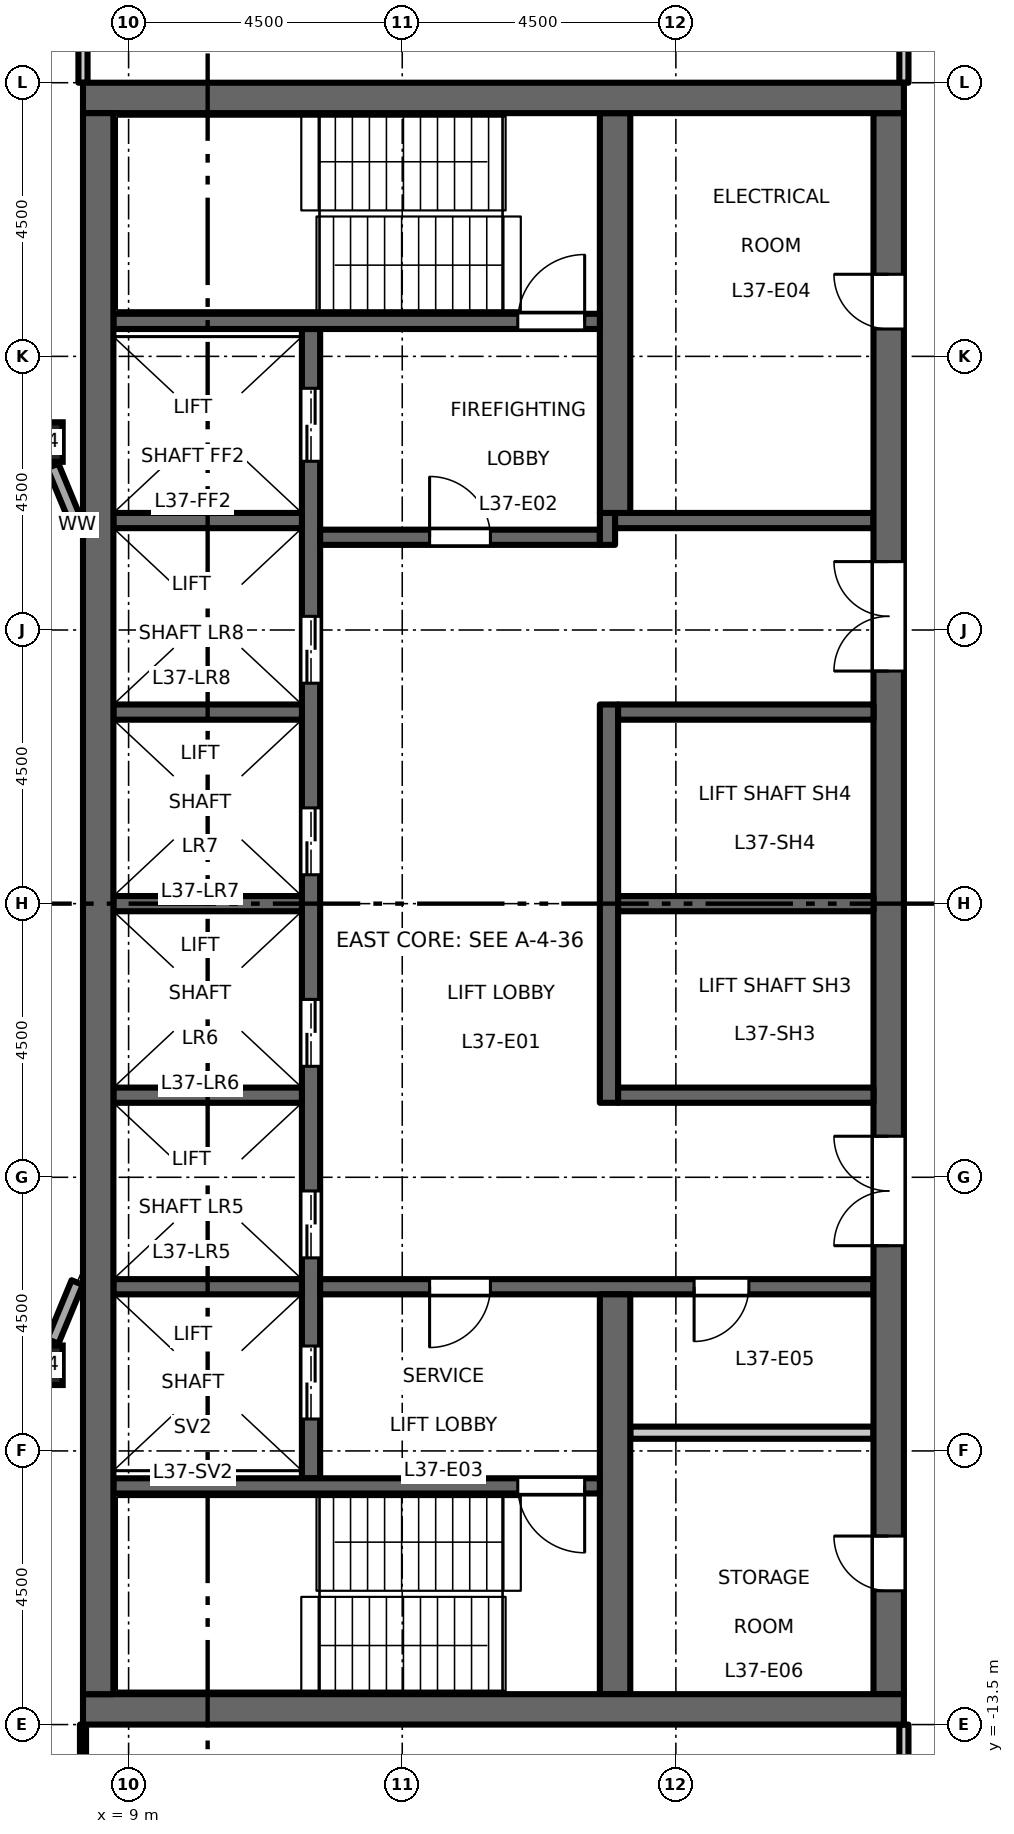
"""IFC4 building model, lengths in metres.
Left out: names, types, materials, properties, quantities, classifications, styles, units other than length and angle.
Written with IfcOpenShell. Run it as: python <this file> out.ifc"""

import sys

from ifc_helpers import new_model, si_unit, direction, frame, frame_2d, origin, origin_2d, place, context, subcontext, project, spatial, rectangle, hollow_rectangle, extrude, element, fill, save


model = new_model("IFC4")
c1 = context("Model", 3, precision=1e-05, world=origin(), true_north=direction((0.0, 1.0)))
c2 = subcontext(c1, "Body", "Model", "MODEL_VIEW")
j1 = project(units=[si_unit("LENGTHUNIT", "METRE"), si_unit("PLANEANGLEUNIT", "RADIAN")], contexts=[c1])
p1 = place(None, origin())
s1 = spatial("IfcSite", under=j1, at=p1, CompositionType="ELEMENT")
p2 = place(p1, origin())
s2 = spatial("IfcBuilding", under=s1, at=p2, CompositionType="ELEMENT")
p3 = place(p2, frame((0.0, 0.0, 172.2)))
s3 = spatial("IfcBuildingStorey", under=s2, at=p3, CompositionType="ELEMENT", Elevation=172.2)
for number, where, z_axis, x_axis in (
    (1, (7.591, -7.591, 0.0), (0.0, 0.0, 1.0), (1.0, 0.0, 0.0)),
    (2, (7.591, 7.591, 0.0), (0.0, 0.0, 1.0), (1.0, 0.0, 0.0)),
):
    element("IfcColumn", number, at=place(p3, frame(where, z_axis=z_axis, x_axis=x_axis)), inside=s3, PredefinedType="COLUMN", context=c2, shape_type="SweptSolid", body=[
        extrude(hollow_rectangle(XDim=0.65, YDim=0.65, WallThickness=0.036, at=origin_2d()), origin(), (0.0, 0.0, 1.0), 4.5),
    ])
p4 = place(p3, frame((12.0, -9.45, 0.0), z_axis=(0.0, 0.0, 1.0), x_axis=(0.0, 1.0, 0.0)))
e3 = element("IfcWall", 3, at=p4, inside=s3, PredefinedType="SHEAR", context=c2, shape_type="SweptSolid", body=[
    extrude(rectangle(XDim=18.9, YDim=0.3, at=frame_2d((9.45, 0.0))), origin(), (0.0, 0.0, 1.0), 4.35),
])
p5 = place(p4, frame((3.625, 0.0, 0.0)))
e4 = element("IfcOpeningElement", 4, at=p5, cuts=e3, PredefinedType="OPENING", context=c2, shape_type="SweptSolid", body=[
    extrude(rectangle(XDim=1.1, YDim=2.1, at=frame_2d((0.55, 1.05))), frame((0.0, 0.16, 0.0), z_axis=(0.0, -1.0, 0.0), x_axis=(1.0, 0.0, 0.0)), (0.0, 0.0, 1.0), 0.32),
])
p6 = place(p4, frame((6.775, 0.0, 0.0)))
e5 = element("IfcOpeningElement", 5, at=p6, cuts=e3, PredefinedType="OPENING", context=c2, shape_type="SweptSolid", body=[
    extrude(rectangle(XDim=1.1, YDim=2.1, at=frame_2d((0.55, 1.05))), frame((0.0, 0.16, 0.0), z_axis=(0.0, -1.0, 0.0), x_axis=(1.0, 0.0, 0.0)), (0.0, 0.0, 1.0), 0.32),
])
p7 = place(p4, frame((9.925, 0.0, 0.0)))
e6 = element("IfcOpeningElement", 6, at=p7, cuts=e3, PredefinedType="OPENING", context=c2, shape_type="SweptSolid", body=[
    extrude(rectangle(XDim=1.1, YDim=2.1, at=frame_2d((0.55, 1.05))), frame((0.0, 0.16, 0.0), z_axis=(0.0, -1.0, 0.0), x_axis=(1.0, 0.0, 0.0)), (0.0, 0.0, 1.0), 0.32),
])
p8 = place(p4, frame((13.075, 0.0, 0.0)))
e7 = element("IfcOpeningElement", 7, at=p8, cuts=e3, PredefinedType="OPENING", context=c2, shape_type="SweptSolid", body=[
    extrude(rectangle(XDim=1.1, YDim=2.1, at=frame_2d((0.55, 1.05))), frame((0.0, 0.16, 0.0), z_axis=(0.0, -1.0, 0.0), x_axis=(1.0, 0.0, 0.0)), (0.0, 0.0, 1.0), 0.32),
])
p9 = place(p4, frame((16.725, 0.0, 0.0)))
e8 = element("IfcOpeningElement", 8, at=p9, cuts=e3, PredefinedType="OPENING", context=c2, shape_type="SweptSolid", body=[
    extrude(rectangle(XDim=1.2, YDim=2.1, at=frame_2d((0.6, 1.05))), frame((0.0, 0.16, 0.0), z_axis=(0.0, -1.0, 0.0), x_axis=(1.0, 0.0, 0.0)), (0.0, 0.0, 1.0), 0.32),
])
p10 = place(p4, frame((0.975, 0.0, 0.0)))
e9 = element("IfcOpeningElement", 9, at=p10, cuts=e3, PredefinedType="OPENING", context=c2, shape_type="SweptSolid", body=[
    extrude(rectangle(XDim=1.2, YDim=2.1, at=frame_2d((0.6, 1.05))), frame((0.0, 0.16, 0.0), z_axis=(0.0, -1.0, 0.0), x_axis=(1.0, 0.0, 0.0)), (0.0, 0.0, 1.0), 0.32),
])
p11 = place(p3, frame((12.15, 6.025, 0.0), z_axis=(0.0, 0.0, 1.0), x_axis=(1.0, 0.0, 0.0)))
e10 = element("IfcWall", 10, at=p11, inside=s3, PredefinedType="SHEAR", context=c2, shape_type="SweptSolid", body=[
    extrude(rectangle(XDim=4.6, YDim=0.25, at=frame_2d((2.3, 0.0))), origin(), (0.0, 0.0, 1.0), 4.35),
])
p12 = place(p11, frame((1.8, 0.0, 0.0)))
e11 = element("IfcOpeningElement", 11, at=p12, cuts=e10, PredefinedType="OPENING", context=c2, shape_type="SweptSolid", body=[
    extrude(rectangle(XDim=1.0, YDim=2.1, at=frame_2d((0.5, 1.05))), frame((0.0, 0.135, 0.0), z_axis=(0.0, -1.0, 0.0), x_axis=(1.0, 0.0, 0.0)), (0.0, 0.0, 1.0), 0.27),
])
p13 = place(p3, frame((16.875, 5.9, 0.0), z_axis=(0.0, 0.0, 1.0), x_axis=(0.0, 1.0, 0.0)))
e12 = element("IfcWall", 12, at=p13, inside=s3, PredefinedType="SHEAR", context=c2, shape_type="SweptSolid", body=[
    extrude(rectangle(XDim=0.525, YDim=0.25, at=frame_2d((0.263, 0.0))), origin(), (0.0, 0.0, 1.0), 4.35),
])
p14 = place(p3, frame((17.0, 6.3, 0.0), z_axis=(0.0, 0.0, 1.0), x_axis=(1.0, 0.0, 0.0)))
e13 = element("IfcWall", 13, at=p14, inside=s3, PredefinedType="SHEAR", context=c2, shape_type="SweptSolid", body=[
    extrude(rectangle(XDim=4.25, YDim=0.25, at=frame_2d((2.125, 0.0))), origin(), (0.0, 0.0, 1.0), 4.35),
])
p15 = place(p3, frame((12.15, -6.3, 0.0), z_axis=(0.0, 0.0, 1.0), x_axis=(1.0, 0.0, 0.0)))
e14 = element("IfcWall", 14, at=p15, inside=s3, PredefinedType="SHEAR", context=c2, shape_type="SweptSolid", body=[
    extrude(rectangle(XDim=9.1, YDim=0.25, at=frame_2d((4.55, 0.0))), origin(), (0.0, 0.0, 1.0), 4.35),
])
p16 = place(p15, frame((1.8, 0.0, 0.0)))
e15 = element("IfcOpeningElement", 15, at=p16, cuts=e14, PredefinedType="OPENING", context=c2, shape_type="SweptSolid", body=[
    extrude(rectangle(XDim=1.0, YDim=2.1, at=frame_2d((0.5, 1.05))), frame((0.0, 0.135, 0.0), z_axis=(0.0, -1.0, 0.0), x_axis=(1.0, 0.0, 0.0)), (0.0, 0.0, 1.0), 0.27),
])
p17 = place(p15, frame((6.15, 0.0, 0.0)))
e16 = element("IfcOpeningElement", 16, at=p17, cuts=e14, PredefinedType="OPENING", context=c2, shape_type="SweptSolid", body=[
    extrude(rectangle(XDim=0.9, YDim=2.1, at=frame_2d((0.45, 1.05))), frame((0.0, 0.135, 0.0), z_axis=(0.0, -1.0, 0.0), x_axis=(1.0, 0.0, 0.0)), (0.0, 0.0, 1.0), 0.27),
])
p18 = place(p3, frame((21.5, -13.0, 0.0), z_axis=(0.0, 0.0, 1.0), x_axis=(0.0, 1.0, 0.0)))
e17 = element("IfcWall", 17, at=p18, inside=s3, PredefinedType="SHEAR", context=c2, shape_type="SweptSolid", body=[
    extrude(rectangle(XDim=26.0, YDim=0.5, at=frame_2d((13.0, 0.0))), origin(), (0.0, 0.0, 1.0), 4.35),
])
p19 = place(p18, frame((16.825, 0.0, 0.0)))
e18 = element("IfcOpeningElement", 18, at=p19, cuts=e17, PredefinedType="OPENING", context=c2, shape_type="SweptSolid", body=[
    extrude(rectangle(XDim=1.8, YDim=2.1, at=frame_2d((0.9, 1.05))), frame((0.0, 0.26, 0.0), z_axis=(0.0, -1.0, 0.0), x_axis=(1.0, 0.0, 0.0)), (0.0, 0.0, 1.0), 0.52),
])
p20 = place(p18, frame((7.375, 0.0, 0.0)))
e19 = element("IfcOpeningElement", 19, at=p20, cuts=e17, PredefinedType="OPENING", context=c2, shape_type="SweptSolid", body=[
    extrude(rectangle(XDim=1.8, YDim=2.1, at=frame_2d((0.9, 1.05))), frame((0.0, 0.26, 0.0), z_axis=(0.0, -1.0, 0.0), x_axis=(1.0, 0.0, 0.0)), (0.0, 0.0, 1.0), 0.52),
])
p21 = place(p18, frame((22.45, 0.0, 0.0)))
e20 = element("IfcOpeningElement", 20, at=p21, cuts=e17, PredefinedType="OPENING", context=c2, shape_type="SweptSolid", body=[
    extrude(rectangle(XDim=0.9, YDim=2.1, at=frame_2d((0.45, 1.05))), frame((0.0, 0.26, 0.0), z_axis=(0.0, -1.0, 0.0), x_axis=(1.0, 0.0, 0.0)), (0.0, 0.0, 1.0), 0.52),
])
p22 = place(p18, frame((1.7, 0.0, 0.0)))
e21 = element("IfcOpeningElement", 21, at=p22, cuts=e17, PredefinedType="OPENING", context=c2, shape_type="SweptSolid", body=[
    extrude(rectangle(XDim=0.9, YDim=2.1, at=frame_2d((0.45, 1.05))), frame((0.0, 0.26, 0.0), z_axis=(0.0, -1.0, 0.0), x_axis=(1.0, 0.0, 0.0)), (0.0, 0.0, 1.0), 0.52),
])
p23 = place(p3, frame((17.25, -8.7, 0.0), z_axis=(0.0, 0.0, 1.0), x_axis=(1.0, 0.0, 0.0)))
e22 = element("IfcWall", 22, at=p23, inside=s3, PredefinedType="PARTITIONING", context=c2, shape_type="SweptSolid", body=[
    extrude(rectangle(XDim=4.0, YDim=0.2, at=frame_2d((2.0, 0.0))), origin(), (0.0, 0.0, 1.0), 4.35),
])
p24 = place(p3, frame((16.9, -3.275, 0.0), z_axis=(0.0, 0.0, 1.0), x_axis=(0.0, 1.0, 0.0)))
e23 = element("IfcWall", 23, at=p24, inside=s3, PredefinedType="SHEAR", context=c2, shape_type="SweptSolid", body=[
    extrude(rectangle(XDim=6.55, YDim=0.3, at=frame_2d((3.275, 0.0))), origin(), (0.0, 0.0, 1.0), 4.35),
])
for number, where, z_axis, x_axis in (
    (24, (17.05, 0.0, 0.0), (0.0, 0.0, 1.0), (1.0, 0.0, 0.0)),
    (25, (17.05, 3.15, 0.0), (0.0, 0.0, 1.0), (1.0, 0.0, 0.0)),
    (26, (17.05, -3.15, 0.0), (0.0, 0.0, 1.0), (1.0, 0.0, 0.0)),
):
    element("IfcWall", number, at=place(p3, frame(where, z_axis=z_axis, x_axis=x_axis)), inside=s3, PredefinedType="SHEAR", context=c2, shape_type="SweptSolid", body=[
        extrude(rectangle(XDim=4.2, YDim=0.25, at=frame_2d((2.1, 0.0))), origin(), (0.0, 0.0, 1.0), 4.35),
    ])
for number, where, z_axis, x_axis in (
    (27, (17.0, 6.425, 0.0), (0.0, 0.0, 1.0), (0.0, 1.0, 0.0)),
    (28, (17.0, -13.0, 0.0), (0.0, 0.0, 1.0), (0.0, 1.0, 0.0)),
):
    element("IfcWall", number, at=place(p3, frame(where, z_axis=z_axis, x_axis=x_axis)), inside=s3, PredefinedType="SHEAR", context=c2, shape_type="SweptSolid", body=[
        extrude(rectangle(XDim=6.575, YDim=0.5, at=frame_2d((3.288, 0.0))), origin(), (0.0, 0.0, 1.0), 4.35),
    ])
for number, where, z_axis, x_axis in (
    (29, (8.75, 0.0, 0.0), (0.0, 0.0, 1.0), (1.0, 0.0, 0.0)),
    (30, (8.75, 3.15, 0.0), (0.0, 0.0, 1.0), (1.0, 0.0, 0.0)),
    (31, (8.75, 6.3, 0.0), (0.0, 0.0, 1.0), (1.0, 0.0, 0.0)),
    (32, (8.75, -3.15, 0.0), (0.0, 0.0, 1.0), (1.0, 0.0, 0.0)),
    (33, (8.75, -6.3, 0.0), (0.0, 0.0, 1.0), (1.0, 0.0, 0.0)),
):
    element("IfcWall", number, at=place(p3, frame(where, z_axis=z_axis, x_axis=x_axis)), inside=s3, PredefinedType="SHEAR", context=c2, shape_type="SweptSolid", body=[
        extrude(rectangle(XDim=3.1, YDim=0.25, at=frame_2d((1.55, 0.0))), origin(), (0.0, 0.0, 1.0), 4.35),
    ])
p25 = place(p3, frame((8.75, 9.575, 0.0), z_axis=(0.0, 0.0, 1.0), x_axis=(1.0, 0.0, 0.0)))
e34 = element("IfcWall", 34, at=p25, inside=s3, PredefinedType="SHEAR", context=c2, shape_type="SweptSolid", body=[
    extrude(rectangle(XDim=8.0, YDim=0.25, at=frame_2d((4.0, 0.0))), origin(), (0.0, 0.0, 1.0), 4.35),
])
p26 = place(p25, frame((6.65, 0.0, 0.0)))
e35 = element("IfcOpeningElement", 35, at=p26, cuts=e34, PredefinedType="OPENING", context=c2, shape_type="SweptSolid", body=[
    extrude(rectangle(XDim=1.1, YDim=2.1, at=frame_2d((0.55, 1.05))), frame((0.0, 0.135, 0.0), z_axis=(0.0, -1.0, 0.0), x_axis=(1.0, 0.0, 0.0)), (0.0, 0.0, 1.0), 0.27),
])
p27 = place(p3, frame((8.75, -9.575, 0.0), z_axis=(0.0, 0.0, 1.0), x_axis=(1.0, 0.0, 0.0)))
e36 = element("IfcWall", 36, at=p27, inside=s3, PredefinedType="SHEAR", context=c2, shape_type="SweptSolid", body=[
    extrude(rectangle(XDim=8.0, YDim=0.25, at=frame_2d((4.0, 0.0))), origin(), (0.0, 0.0, 1.0), 4.35),
])
p28 = place(p27, frame((6.65, 0.0, 0.0)))
e37 = element("IfcOpeningElement", 37, at=p28, cuts=e36, PredefinedType="OPENING", context=c2, shape_type="SweptSolid", body=[
    extrude(rectangle(XDim=1.1, YDim=2.1, at=frame_2d((0.55, 1.05))), frame((0.0, 0.135, 0.0), z_axis=(0.0, -1.0, 0.0), x_axis=(1.0, 0.0, 0.0)), (0.0, 0.0, 1.0), 0.27),
])
for number, where, z_axis, x_axis in (
    (38, (8.25, 13.25, 0.0), (0.0, 0.0, 1.0), (1.0, 0.0, 0.0)),
    (39, (8.25, -13.25, 0.0), (0.0, 0.0, 1.0), (1.0, 0.0, 0.0)),
):
    element("IfcWall", number, at=place(p3, frame(where, z_axis=z_axis, x_axis=x_axis)), inside=s3, PredefinedType="SHEAR", context=c2, shape_type="SweptSolid", body=[
        extrude(rectangle(XDim=13.5, YDim=0.5, at=frame_2d((6.75, 0.0))), origin(), (0.0, 0.0, 1.0), 4.35),
    ])
p29 = place(p3, frame((8.5, -13.0, 0.0), z_axis=(0.0, 0.0, 1.0), x_axis=(0.0, 1.0, 0.0)))
e40 = element("IfcWall", 40, at=p29, inside=s3, PredefinedType="SHEAR", context=c2, shape_type="SweptSolid", body=[
    extrude(rectangle(XDim=26.0, YDim=0.5, at=frame_2d((13.0, 0.0))), origin(), (0.0, 0.0, 1.0), 4.35),
])
for number, where, z_axis, x_axis in (
    (41, (7.753, -7.199, 0.0), (0.0, 0.0, 1.0), (0.383, 0.924, 0.0)),
    (42, (8.154, 6.231, 0.0), (0.0, 0.0, 1.0), (-0.383, 0.924, 0.0)),
):
    element("IfcWall", number, at=place(p3, frame(where, z_axis=z_axis, x_axis=x_axis)), inside=s3, PredefinedType="STANDARD", context=c2, shape_type="SweptSolid", body=[
        extrude(rectangle(XDim=1.048, YDim=0.2, at=frame_2d((0.524, 0.0))), origin(), (0.0, 0.0, 1.0), 3.826),
    ])
p30 = place(p3, frame((8.25, -18.925, 0.0), z_axis=(0.0, 0.0, 1.0), x_axis=(0.0, 1.0, 0.0)))
e43 = element("IfcWall", 43, at=p30, inside=s3, PredefinedType="PARTITIONING", context=c2, shape_type="SweptSolid", body=[
    extrude(rectangle(XDim=5.425, YDim=0.1, at=frame_2d((2.712, 0.0))), origin(), (0.0, 0.0, 1.0), 4.35),
])
p31 = place(p3, frame((8.25, 13.5, 0.0), z_axis=(0.0, 0.0, 1.0), x_axis=(0.0, 1.0, 0.0)))
e44 = element("IfcWall", 44, at=p31, inside=s3, PredefinedType="PARTITIONING", context=c2, shape_type="SweptSolid", body=[
    extrude(rectangle(XDim=3.3, YDim=0.15, at=frame_2d((1.65, 0.0))), origin(), (0.0, 0.0, 1.0), 4.35),
])
for number, where, z_axis, x_axis in (
    (45, (21.75, -18.925, 0.0), (0.0, 0.0, 1.0), (0.0, 1.0, 0.0)),
    (46, (21.75, 13.5, 0.0), (0.0, 0.0, 1.0), (0.0, 1.0, 0.0)),
):
    element("IfcWall", number, at=place(p3, frame(where, z_axis=z_axis, x_axis=x_axis)), inside=s3, PredefinedType="PARTITIONING", context=c2, shape_type="SweptSolid", body=[
        extrude(rectangle(XDim=5.425, YDim=0.15, at=frame_2d((2.712, 0.0))), origin(), (0.0, 0.0, 1.0), 4.35),
    ])
p32 = place(p12, origin())
e47 = element("IfcDoor", 47, at=p32, inside=s3, OperationType="SINGLE_SWING_RIGHT", PredefinedType="DOOR", context=c2, shape_type="SweptSolid", body=[
    extrude(rectangle(XDim=1.0, YDim=2.1, at=frame_2d((0.5, 1.05))), frame((0.0, 0.025, 0.0), z_axis=(0.0, -1.0, 0.0), x_axis=(1.0, 0.0, 0.0)), (0.0, 0.0, 1.0), 0.05),
])
fill(e11, e47)
p33 = place(p16, origin())
e48 = element("IfcDoor", 48, at=p33, inside=s3, OperationType="SINGLE_SWING_LEFT", PredefinedType="DOOR", context=c2, shape_type="SweptSolid", body=[
    extrude(rectangle(XDim=1.0, YDim=2.1, at=frame_2d((0.5, 1.05))), frame((0.0, 0.025, 0.0), z_axis=(0.0, -1.0, 0.0), x_axis=(1.0, 0.0, 0.0)), (0.0, 0.0, 1.0), 0.05),
])
fill(e15, e48)
p34 = place(p26, origin())
e49 = element("IfcDoor", 49, at=p34, inside=s3, OperationType="SINGLE_SWING_LEFT", PredefinedType="DOOR", context=c2, shape_type="SweptSolid", body=[
    extrude(rectangle(XDim=1.1, YDim=2.1, at=frame_2d((0.55, 1.05))), frame((0.0, 0.025, 0.0), z_axis=(0.0, -1.0, 0.0), x_axis=(1.0, 0.0, 0.0)), (0.0, 0.0, 1.0), 0.05),
])
fill(e35, e49)
p35 = place(p28, origin())
e50 = element("IfcDoor", 50, at=p35, inside=s3, OperationType="SINGLE_SWING_RIGHT", PredefinedType="DOOR", context=c2, shape_type="SweptSolid", body=[
    extrude(rectangle(XDim=1.1, YDim=2.1, at=frame_2d((0.55, 1.05))), frame((0.0, 0.025, 0.0), z_axis=(0.0, -1.0, 0.0), x_axis=(1.0, 0.0, 0.0)), (0.0, 0.0, 1.0), 0.05),
])
fill(e37, e50)
p36 = place(p19, origin())
e51 = element("IfcDoor", 51, at=p36, inside=s3, OperationType="DOUBLE_DOOR_DOUBLE_SWING", PredefinedType="DOOR", context=c2, shape_type="SweptSolid", body=[
    extrude(rectangle(XDim=1.8, YDim=2.1, at=frame_2d((0.9, 1.05))), frame((0.0, 0.025, 0.0), z_axis=(0.0, -1.0, 0.0), x_axis=(1.0, 0.0, 0.0)), (0.0, 0.0, 1.0), 0.05),
])
fill(e18, e51)
p37 = place(p20, origin())
e52 = element("IfcDoor", 52, at=p37, inside=s3, OperationType="DOUBLE_DOOR_DOUBLE_SWING", PredefinedType="DOOR", context=c2, shape_type="SweptSolid", body=[
    extrude(rectangle(XDim=1.8, YDim=2.1, at=frame_2d((0.9, 1.05))), frame((0.0, 0.025, 0.0), z_axis=(0.0, -1.0, 0.0), x_axis=(1.0, 0.0, 0.0)), (0.0, 0.0, 1.0), 0.05),
])
fill(e19, e52)
p38 = place(p5, origin())
e53 = element("IfcDoor", 53, at=p38, inside=s3, OperationType="DOUBLE_DOOR_SLIDING", PredefinedType="DOOR", context=c2, shape_type="SweptSolid", body=[
    extrude(rectangle(XDim=1.1, YDim=2.1, at=frame_2d((0.55, 1.05))), frame((0.0, 0.025, 0.0), z_axis=(0.0, -1.0, 0.0), x_axis=(1.0, 0.0, 0.0)), (0.0, 0.0, 1.0), 0.05),
])
fill(e4, e53)
p39 = place(p6, origin())
e54 = element("IfcDoor", 54, at=p39, inside=s3, OperationType="DOUBLE_DOOR_SLIDING", PredefinedType="DOOR", context=c2, shape_type="SweptSolid", body=[
    extrude(rectangle(XDim=1.1, YDim=2.1, at=frame_2d((0.55, 1.05))), frame((0.0, 0.025, 0.0), z_axis=(0.0, -1.0, 0.0), x_axis=(1.0, 0.0, 0.0)), (0.0, 0.0, 1.0), 0.05),
])
fill(e5, e54)
p40 = place(p7, origin())
e55 = element("IfcDoor", 55, at=p40, inside=s3, OperationType="DOUBLE_DOOR_SLIDING", PredefinedType="DOOR", context=c2, shape_type="SweptSolid", body=[
    extrude(rectangle(XDim=1.1, YDim=2.1, at=frame_2d((0.55, 1.05))), frame((0.0, 0.025, 0.0), z_axis=(0.0, -1.0, 0.0), x_axis=(1.0, 0.0, 0.0)), (0.0, 0.0, 1.0), 0.05),
])
fill(e6, e55)
p41 = place(p8, origin())
e56 = element("IfcDoor", 56, at=p41, inside=s3, OperationType="DOUBLE_DOOR_SLIDING", PredefinedType="DOOR", context=c2, shape_type="SweptSolid", body=[
    extrude(rectangle(XDim=1.1, YDim=2.1, at=frame_2d((0.55, 1.05))), frame((0.0, 0.025, 0.0), z_axis=(0.0, -1.0, 0.0), x_axis=(1.0, 0.0, 0.0)), (0.0, 0.0, 1.0), 0.05),
])
fill(e7, e56)
p42 = place(p9, origin())
e57 = element("IfcDoor", 57, at=p42, inside=s3, OperationType="DOUBLE_DOOR_SLIDING", PredefinedType="DOOR", context=c2, shape_type="SweptSolid", body=[
    extrude(rectangle(XDim=1.2, YDim=2.1, at=frame_2d((0.6, 1.05))), frame((0.0, 0.025, 0.0), z_axis=(0.0, -1.0, 0.0), x_axis=(1.0, 0.0, 0.0)), (0.0, 0.0, 1.0), 0.05),
])
fill(e8, e57)
p43 = place(p10, origin())
e58 = element("IfcDoor", 58, at=p43, inside=s3, OperationType="DOUBLE_DOOR_SLIDING", PredefinedType="DOOR", context=c2, shape_type="SweptSolid", body=[
    extrude(rectangle(XDim=1.2, YDim=2.1, at=frame_2d((0.6, 1.05))), frame((0.0, 0.025, 0.0), z_axis=(0.0, -1.0, 0.0), x_axis=(1.0, 0.0, 0.0)), (0.0, 0.0, 1.0), 0.05),
])
fill(e9, e58)
p44 = place(p21, origin())
e59 = element("IfcDoor", 59, at=p44, inside=s3, OperationType="SINGLE_SWING_LEFT", PredefinedType="DOOR", context=c2, shape_type="SweptSolid", body=[
    extrude(rectangle(XDim=0.9, YDim=2.1, at=frame_2d((0.45, 1.05))), frame((0.0, 0.025, 0.0), z_axis=(0.0, -1.0, 0.0), x_axis=(1.0, 0.0, 0.0)), (0.0, 0.0, 1.0), 0.05),
])
fill(e20, e59)
p45 = place(p17, origin())
e60 = element("IfcDoor", 60, at=p45, inside=s3, OperationType="SINGLE_SWING_LEFT", PredefinedType="DOOR", context=c2, shape_type="SweptSolid", body=[
    extrude(rectangle(XDim=0.9, YDim=2.1, at=frame_2d((0.45, 1.05))), frame((0.0, 0.025, 0.0), z_axis=(0.0, -1.0, 0.0), x_axis=(1.0, 0.0, 0.0)), (0.0, 0.0, 1.0), 0.05),
])
fill(e16, e60)
p46 = place(p22, origin())
e61 = element("IfcDoor", 61, at=p46, inside=s3, OperationType="SINGLE_SWING_LEFT", PredefinedType="DOOR", context=c2, shape_type="SweptSolid", body=[
    extrude(rectangle(XDim=0.9, YDim=2.1, at=frame_2d((0.45, 1.05))), frame((0.0, 0.025, 0.0), z_axis=(0.0, -1.0, 0.0), x_axis=(1.0, 0.0, 0.0)), (0.0, 0.0, 1.0), 0.05),
])
fill(e21, e61)
save(model, sys.argv[1])
